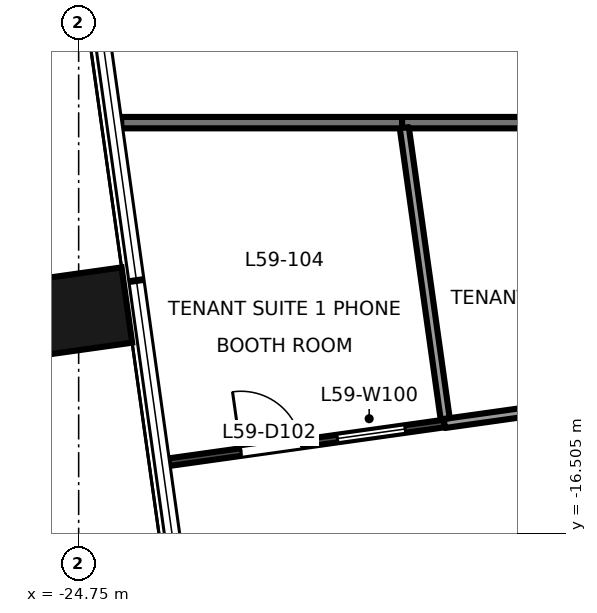
"""IFC4 building model, lengths in metres.
Left out: names, types, materials, properties, quantities, classifications, styles, units other than length and angle.
Written with IfcOpenShell. Run it as: python <this file> out.ifc"""

import sys

from ifc_helpers import new_model, si_unit, direction, frame, frame_2d, origin, origin_2d, place, context, subcontext, project, spatial, rectangle, extrude, element, fill, save


model = new_model("IFC4")
c1 = context("Model", 3, precision=1e-05, world=origin(), true_north=direction((0.0, 1.0)))
c2 = subcontext(c1, "Body", "Model", "MODEL_VIEW")
j1 = project(units=[si_unit("LENGTHUNIT", "METRE"), si_unit("PLANEANGLEUNIT", "RADIAN")], contexts=[c1])
p1 = place(None, origin())
s1 = spatial("IfcSite", under=j1, at=p1, CompositionType="ELEMENT")
p2 = place(p1, origin())
s2 = spatial("IfcBuilding", under=s1, at=p2, CompositionType="ELEMENT")
p3 = place(p2, frame((0.0, 0.0, 259.0)))
s3 = spatial("IfcBuildingStorey", under=s2, at=p3, CompositionType="ELEMENT", Elevation=259.0)
p4 = place(p3, frame((-25.007, -13.625, -0.2), z_axis=(0.0, 0.0, 1.0), x_axis=(-0.139190384377, 0.990265639562, 0.0)))
e1 = element("IfcColumn", 1, at=p4, inside=s3, PredefinedType="COLUMN", context=c2, shape_type="SweptSolid", body=[
    extrude(rectangle(XDim=1.0, YDim=1.8, at=origin_2d()), origin(), (0.0, 0.0, 1.0), 3.9),
])
p5 = place(p3, frame((-20.495, -11.1, 0.0), z_axis=(0.0, 0.0, 1.0), x_axis=(-1.0, 0.0, 0.0)))
e2 = element("IfcWall", 2, at=p5, inside=s3, PredefinedType="PARTITIONING", context=c2, shape_type="SweptSolid", body=[
    extrude(rectangle(XDim=3.695, YDim=0.15, at=frame_2d((1.847, 0.0))), origin(), (0.0, 0.0, 1.0), 3.7),
])
p6 = place(p3, frame((-15.042, -11.1, 0.0), z_axis=(0.0, 0.0, 1.0), x_axis=(-1.0, 0.0, 0.0)))
e3 = element("IfcWall", 3, at=p6, inside=s3, PredefinedType="PARTITIONING", context=c2, shape_type="SweptSolid", body=[
    extrude(rectangle(XDim=5.453, YDim=0.15, at=frame_2d((2.727, 0.0))), origin(), (0.0, 0.0, 1.0), 3.7),
])
p7 = place(p3, frame((-23.563, -15.567, 0.0), z_axis=(0.0, 0.0, 1.0), x_axis=(0.990288176908, 0.139029948846, 0.0)))
e4 = element("IfcWall", 4, at=p7, inside=s3, PredefinedType="PARTITIONING", context=c2, shape_type="SweptSolid", body=[
    extrude(rectangle(XDim=3.66, YDim=0.1, at=frame_2d((1.83, 0.0))), origin(), (0.0, 0.0, 1.0), 3.7),
])
p8 = place(p7, frame((0.958, 0.0, 0.0)))
e5 = element("IfcOpeningElement", 5, at=p8, cuts=e4, PredefinedType="OPENING", context=c2, shape_type="SweptSolid", body=[
    extrude(rectangle(XDim=0.8, YDim=2.1, at=frame_2d((0.4, 1.05))), frame((0.0, 0.061, 0.0), z_axis=(0.0, -1.0, 0.0), x_axis=(1.0, 0.0, 0.0)), (0.0, 0.0, 1.0), 0.121),
])
p9 = place(p7, frame((2.239, 0.0, 0.9)))
e6 = element("IfcOpeningElement", 6, at=p9, cuts=e4, PredefinedType="OPENING", context=c2, shape_type="SweptSolid", body=[
    extrude(rectangle(XDim=0.9, YDim=1.2, at=frame_2d((0.45, 0.6))), frame((0.0, 0.061, 0.0), z_axis=(0.0, -1.0, 0.0), x_axis=(1.0, 0.0, 0.0)), (0.0, 0.0, 1.0), 0.121),
])
p10 = place(p3, frame((-19.939, -15.058, 0.0), z_axis=(0.0, 0.0, 1.0), x_axis=(0.99027122958, 0.139150608569, 0.0)))
e7 = element("IfcWall", 7, at=p10, inside=s3, PredefinedType="PARTITIONING", context=c2, shape_type="SweptSolid", body=[
    extrude(rectangle(XDim=5.42, YDim=0.12, at=frame_2d((2.71, 0.0))), origin(), (0.0, 0.0, 1.0), 3.7),
])
p11 = place(p10, frame((1.456, 0.0, 0.0)))
e8 = element("IfcOpeningElement", 8, at=p11, cuts=e7, PredefinedType="OPENING", context=c2, shape_type="SweptSolid", body=[
    extrude(rectangle(XDim=0.9, YDim=2.1, at=frame_2d((0.45, 1.05))), frame((0.0, 0.071, 0.0), z_axis=(0.0, -1.0, 0.0), x_axis=(1.0, 0.0, 0.0)), (0.0, 0.0, 1.0), 0.141),
])
p12 = place(p3, frame((-20.466, -11.167, 0.0), z_axis=(0.0, 0.0, 1.0), x_axis=(0.139192901143, -0.990265285806, 0.0)))
e9 = element("IfcWall", 9, at=p12, inside=s3, PredefinedType="PARTITIONING", context=c2, shape_type="SweptSolid", body=[
    extrude(rectangle(XDim=3.866, YDim=0.12, at=frame_2d((1.933, 0.0))), origin(), (0.0, 0.0, 1.0), 3.7),
])
p13 = place(p8, origin())
e10 = element("IfcDoor", 10, at=p13, inside=s3, OperationType="SINGLE_SWING_LEFT", PredefinedType="DOOR", context=c2, shape_type="SweptSolid", body=[
    extrude(rectangle(XDim=0.8, YDim=2.1, at=frame_2d((0.4, 1.05))), frame((0.0, 0.025, 0.0), z_axis=(0.0, -1.0, 0.0), x_axis=(1.0, 0.0, 0.0)), (0.0, 0.0, 1.0), 0.05),
])
fill(e5, e10)
p14 = place(p9, origin())
e11 = element("IfcWindow", 11, at=p14, inside=s3, PartitioningType="SINGLE_PANEL", PredefinedType="WINDOW", context=c2, shape_type="SweptSolid", body=[
    extrude(rectangle(XDim=0.9, YDim=1.2, at=frame_2d((0.45, 0.6))), frame((0.0, 0.03, 0.0), z_axis=(0.0, -1.0, 0.0), x_axis=(1.0, 0.0, 0.0)), (0.0, 0.0, 1.0), 0.06),
])
fill(e6, e11)
save(model, sys.argv[1])
